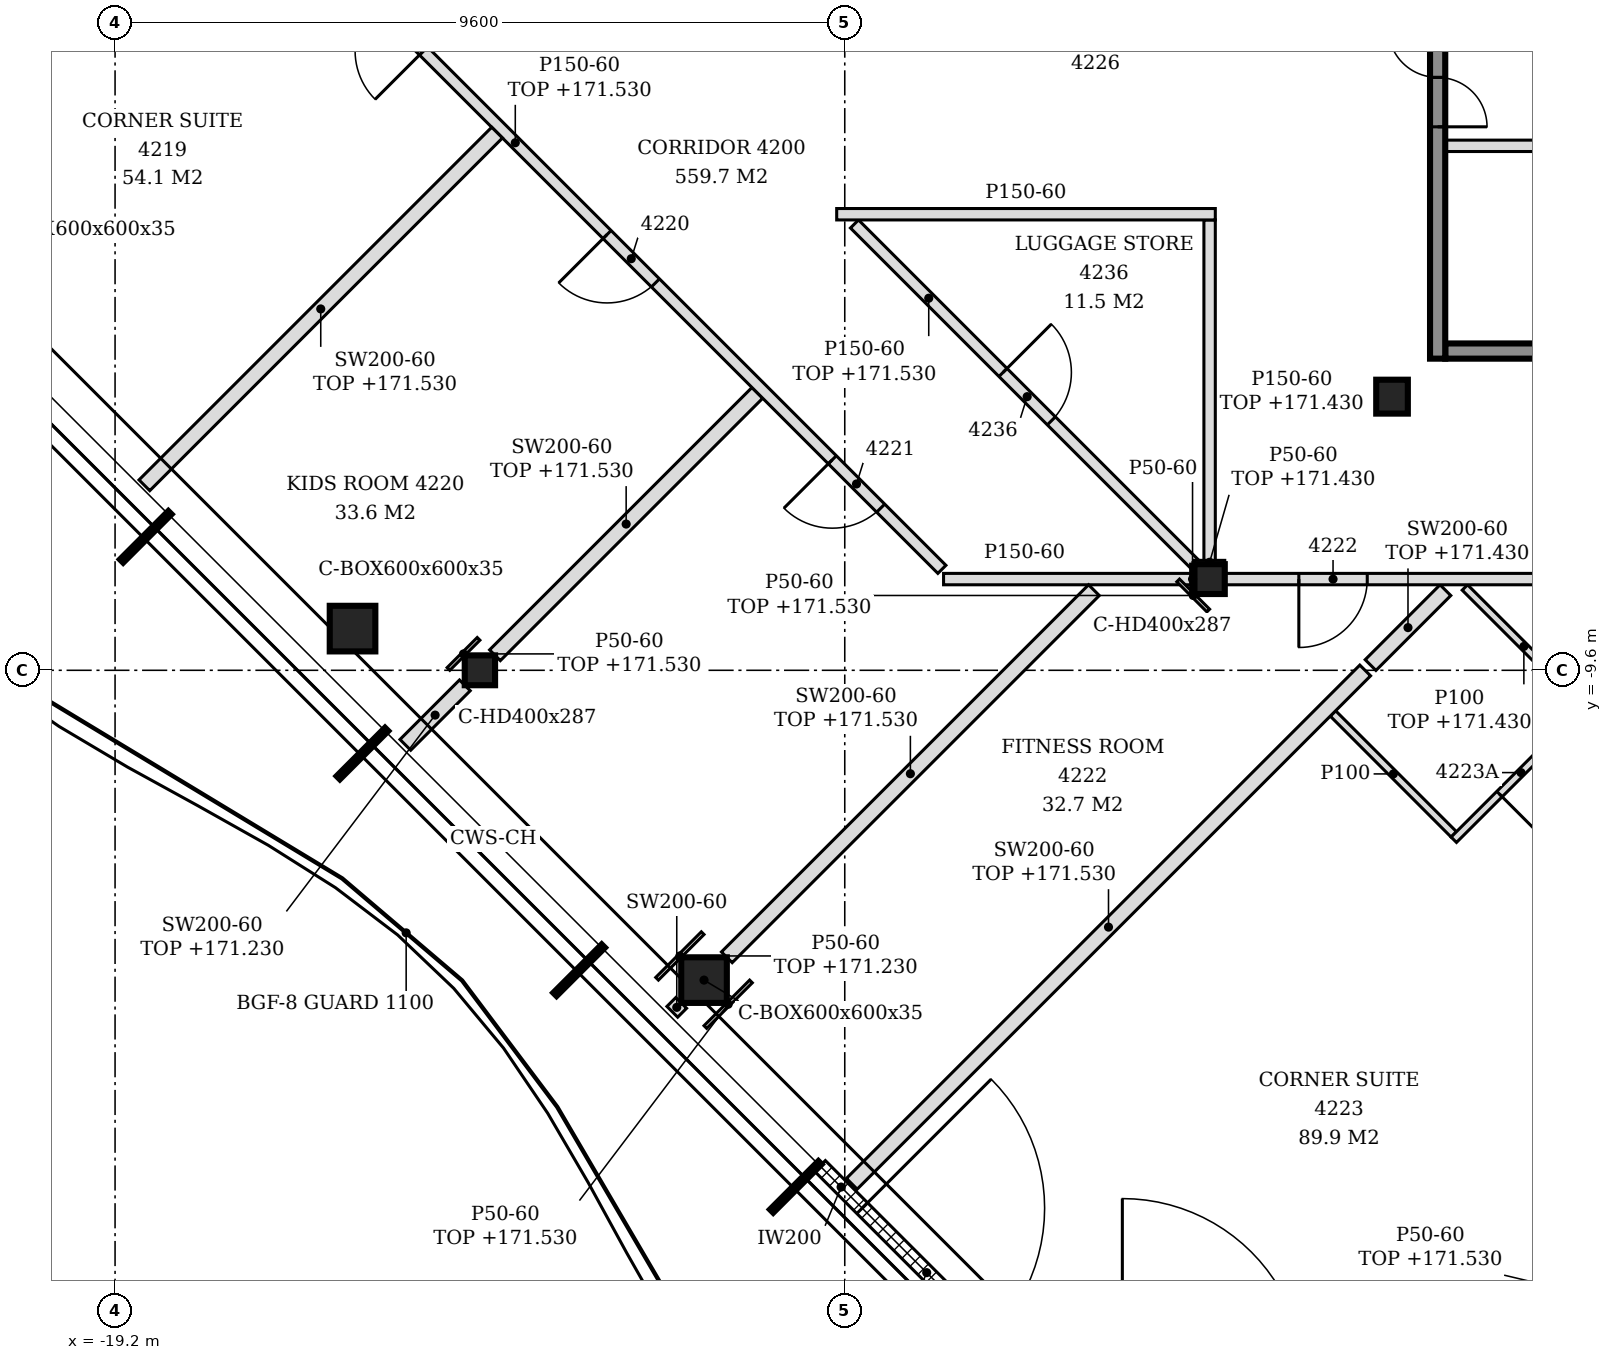
"""IFC4 building model, lengths in metres.
Left out: names, types, materials, properties, quantities, classifications, styles, units other than length and angle.
Written with IfcOpenShell. Run it as: python <this file> out.ifc"""

import sys

from ifc_helpers import new_model, si_unit, direction, frame, frame_2d, origin, origin_2d, place, context, subcontext, project, spatial, polyline, rectangle, hollow_rectangle, i_section, outline, extrude, clip, halfspace, element, fill, save


model = new_model("IFC4")
c1 = context("Model", 3, precision=1e-05, world=origin(), true_north=direction((0.0, 1.0)))
c2 = subcontext(c1, "Body", "Model", "MODEL_VIEW")
j1 = project(units=[si_unit("LENGTHUNIT", "METRE"), si_unit("PLANEANGLEUNIT", "RADIAN")], contexts=[c1])
p1 = place(None, origin())
s1 = spatial("IfcSite", under=j1, at=p1, CompositionType="ELEMENT")
p2 = place(p1, origin())
s2 = spatial("IfcBuilding", under=s1, at=p2, CompositionType="ELEMENT")
p3 = place(p2, frame((0.0, 0.0, 168.6)))
s3 = spatial("IfcBuildingStorey", under=s2, at=p3, CompositionType="ELEMENT", Elevation=168.6)
for number, where, z_axis, x_axis in (
    (1, (-16.076, -9.052, -0.15), (0.0, 0.0, 1.0), (1.0, 0.0, 0.0)),
    (2, (-11.451, -13.676, -0.15), (0.0, 0.0, 1.0), (1.0, 0.0, 0.0)),
):
    element("IfcColumn", number, at=place(p3, frame(where, z_axis=z_axis, x_axis=x_axis)), inside=s3, PredefinedType="COLUMN", context=c2, shape_type="Clipping", body=[
        clip(extrude(hollow_rectangle(XDim=0.6, YDim=0.6, WallThickness=0.035, at=origin_2d()), origin(), (0.0, 0.0, 1.0), 3.6), halfspace(frame((0.0, 0.0, 3.589), z_axis=(0.0, 0.0, 1.0), x_axis=(1.0, 0.0, 0.0)), False)),
    ])
p4 = place(p3, frame((-4.8, -8.4, -0.15), z_axis=(0.0, 0.0, 1.0), x_axis=(1.0, 0.0, 0.0)))
e3 = element("IfcColumn", 3, at=p4, inside=s3, PredefinedType="COLUMN", context=c2, shape_type="SweptSolid", body=[
    extrude(i_section(OverallWidth=0.399, OverallDepth=0.393, WebThickness=0.023, FlangeThickness=0.037, FilletRadius=0.015, at=origin_2d()), origin(), (0.0, 0.0, 1.0), 3.6),
])
p5 = place(p3, frame((-2.4, -6.0, -0.15), z_axis=(0.0, 0.0, 1.0), x_axis=(1.0, 0.0, 0.0)))
e4 = element("IfcColumn", 4, at=p5, inside=s3, PredefinedType="COLUMN", context=c2, shape_type="SweptSolid", body=[
    extrude(i_section(OverallWidth=0.416, OverallDepth=0.446, WebThickness=0.039, FlangeThickness=0.063, FilletRadius=0.015, at=origin_2d()), origin(), (0.0, 0.0, 1.0), 3.6),
])
p6 = place(p3, frame((-14.4, -9.6, -0.15), z_axis=(0.0, 0.0, 1.0), x_axis=(1.0, 0.0, 0.0)))
e5 = element("IfcColumn", 5, at=p6, inside=s3, PredefinedType="COLUMN", context=c2, shape_type="SweptSolid", body=[
    extrude(i_section(OverallWidth=0.399, OverallDepth=0.393, WebThickness=0.023, FlangeThickness=0.037, FilletRadius=0.015, at=origin_2d()), origin(), (0.0, 0.0, 1.0), 3.6),
])
p7 = place(p3, frame((-9.926, -16.121, 0.0), z_axis=(0.0, 0.0, 1.0), x_axis=(0.707137595296, -0.707075965734, 0.0)))
e6 = element("IfcWall", 6, at=p7, inside=s3, PredefinedType="NOTDEFINED", context=c2, shape_type="SweptSolid", body=[
    extrude(rectangle(XDim=3.961, YDim=0.2, at=frame_2d((1.981, 0.0))), origin(), (0.0, 0.0, 1.0), 3.45),
])
p8 = place(p7, frame((0.785, 0.0, 0.0)))
e7 = element("IfcOpeningElement", 7, at=p8, cuts=e6, PredefinedType="OPENING", context=c2, shape_type="SweptSolid", body=[
    extrude(rectangle(XDim=2.4, YDim=2.4, at=frame_2d((1.2, 1.2))), frame((0.0, 0.11, 0.0), z_axis=(0.0, -1.0, 0.0), x_axis=(1.0, 0.0, 0.0)), (0.0, 0.0, 1.0), 0.22),
])
p9 = place(p3, frame((-1.7, -5.4, 0.0), z_axis=(0.0, 0.0, 1.0), x_axis=(1.0, 0.0, 0.0)))
e8 = element("IfcWall", 8, at=p9, inside=s3, PredefinedType="SOLIDWALL", context=c2, shape_type="SweptSolid", body=[
    extrude(rectangle(XDim=7.9, YDim=0.2, at=frame_2d((3.95, 0.0))), origin(), (0.0, 0.0, 1.0), 3.45),
])
p10 = place(p3, frame((-1.7, -2.7, 0.0), z_axis=(0.0, 0.0, 1.0), x_axis=(1.0, 0.0, 0.0)))
e9 = element("IfcWall", 9, at=p10, inside=s3, PredefinedType="PARTITIONING", context=c2, shape_type="SweptSolid", body=[
    extrude(rectangle(XDim=7.825, YDim=0.15, at=frame_2d((3.913, 0.0))), origin(), (0.0, 0.0, 1.0), 3.45),
])
p11 = place(p10, frame((3.45, 0.0, 0.0)))
e10 = element("IfcOpeningElement", 10, at=p11, cuts=e9, PredefinedType="OPENING", context=c2, shape_type="SweptSolid", body=[
    extrude(rectangle(XDim=0.9, YDim=2.1, at=frame_2d((0.45, 1.05))), frame((0.0, 0.085, 0.0), z_axis=(0.0, -1.0, 0.0), x_axis=(1.0, 0.0, 0.0)), (0.0, 0.0, 1.0), 0.17),
])
p12 = place(p3, frame((-1.8, -5.5, 0.0), z_axis=(0.0, 0.0, 1.0), x_axis=(0.0, 1.0, 0.0)))
e11 = element("IfcWall", 11, at=p12, inside=s3, PredefinedType="SOLIDWALL", context=c2, shape_type="SweptSolid", body=[
    extrude(rectangle(XDim=15.8, YDim=0.2, at=frame_2d((7.9, 0.0))), origin(), (0.0, 0.0, 1.0), 3.45),
])
p13 = place(p12, frame((3.05, 0.0, 0.0)))
e12 = element("IfcOpeningElement", 12, at=p13, cuts=e11, PredefinedType="OPENING", context=c2, shape_type="SweptSolid", body=[
    extrude(rectangle(XDim=1.3, YDim=2.1, at=frame_2d((0.65, 1.05))), frame((0.0, 0.11, 0.0), z_axis=(0.0, -1.0, 0.0), x_axis=(1.0, 0.0, 0.0)), (0.0, 0.0, 1.0), 0.22),
])
p14 = place(p12, frame((11.45, 0.0, 0.0)))
e13 = element("IfcOpeningElement", 13, at=p14, cuts=e11, PredefinedType="OPENING", context=c2, shape_type="SweptSolid", body=[
    extrude(rectangle(XDim=1.3, YDim=2.1, at=frame_2d((0.65, 1.05))), frame((0.0, 0.11, 0.0), z_axis=(0.0, -1.0, 0.0), x_axis=(1.0, 0.0, 0.0)), (0.0, 0.0, 1.0), 0.22),
])
p15 = place(p3, frame((-9.507, -16.355, 0.0), z_axis=(0.0, 0.0, 1.0), x_axis=(0.707170680804, 0.707042875794, 0.0)))
e14 = element("IfcWall", 14, at=p15, inside=s3, PredefinedType="PARTITIONING", context=c2, shape_type="SweptSolid", body=[
    extrude(rectangle(XDim=9.551, YDim=0.2, at=frame_2d((4.776, 0.0))), origin(), (0.0, 0.0, 1.0), 2.93),
])
p16 = place(p3, frame((-11.869, -14.093, 0.0), z_axis=(0.0, 0.0, 1.0), x_axis=(0.707106781187, 0.707106781187, 0.0)))
e15 = element("IfcWall", 15, at=p16, inside=s3, PredefinedType="PARTITIONING", context=c2, shape_type="SweptSolid", body=[
    extrude(rectangle(XDim=0.166, YDim=0.2, at=frame_2d((0.083, 0.0))), origin(), (0.0, 0.0, 1.0), 3.45),
])
p17 = place(p3, frame((-11.152, -13.375, 0.0), z_axis=(0.0, 0.0, 1.0), x_axis=(0.707106781187, 0.707106781187, 0.0)))
e16 = element("IfcWall", 16, at=p17, inside=s3, PredefinedType="PARTITIONING", context=c2, shape_type="SweptSolid", body=[
    extrude(rectangle(XDim=6.83, YDim=0.2, at=frame_2d((3.415, 0.0))), origin(), (0.0, 0.0, 1.0), 2.93),
])
p18 = place(p3, frame((-1.587, -11.759, 0.0), z_axis=(0.0, 0.0, 1.0), x_axis=(-0.706889644159, 0.707323851557, 0.0)))
e17 = element("IfcWall", 17, at=p18, inside=s3, PredefinedType="PARTITIONING", context=c2, shape_type="SweptSolid", body=[
    extrude(rectangle(XDim=2.249, YDim=0.1, at=frame_2d((1.125, 0.0))), origin(), (0.0, 0.0, 1.0), 3.45),
])
p19 = place(p3, frame((-1.587, -11.829, 0.0), z_axis=(0.0, 0.0, 1.0), x_axis=(0.707350821469, 0.706862656651, 0.0)))
e18 = element("IfcWall", 18, at=p19, inside=s3, PredefinedType="PARTITIONING", context=c2, shape_type="SweptSolid", body=[
    extrude(rectangle(XDim=2.5, YDim=0.1, at=frame_2d((1.25, 0.0))), origin(), (0.0, 0.0, 1.0), 3.45),
])
p20 = place(p19, frame((0.85, 0.0, 0.0)))
e19 = element("IfcOpeningElement", 19, at=p20, cuts=e18, PredefinedType="OPENING", context=c2, shape_type="SweptSolid", body=[
    extrude(rectangle(XDim=0.8, YDim=2.1, at=frame_2d((0.4, 1.05))), frame((0.0, 0.06, 0.0), z_axis=(0.0, -1.0, 0.0), x_axis=(1.0, 0.0, 0.0)), (0.0, 0.0, 1.0), 0.12),
])
p21 = place(p3, frame((-15.381, -10.581, 0.0), z_axis=(0.0, 0.0, 1.0), x_axis=(0.707217034054, 0.706996511125, 0.0)))
e20 = element("IfcWall", 20, at=p21, inside=s3, PredefinedType="PARTITIONING", context=c2, shape_type="SweptSolid", body=[
    extrude(rectangle(XDim=1.107, YDim=0.2, at=frame_2d((0.554, 0.0))), origin(), (0.0, 0.0, 1.0), 2.63),
])
p22 = place(p3, frame((0.111, -10.062, 0.0), z_axis=(0.0, 0.0, 1.0), x_axis=(-0.70732924673, 0.706884245631, 0.0)))
e21 = element("IfcWall", 21, at=p22, inside=s3, PredefinedType="PARTITIONING", context=c2, shape_type="SweptSolid", body=[
    extrude(rectangle(XDim=2.195, YDim=0.1, at=frame_2d((1.097, 0.0))), origin(), (0.0, 0.0, 1.0), 2.83),
])
p23 = place(p3, frame((-2.683, -9.531, 0.0), z_axis=(0.0, 0.0, 1.0), x_axis=(0.707019164958, 0.70719438656, 0.0)))
e22 = element("IfcWall", 22, at=p23, inside=s3, PredefinedType="PARTITIONING", context=c2, shape_type="SweptSolid", body=[
    extrude(rectangle(XDim=1.393, YDim=0.2, at=frame_2d((0.697, 0.0))), origin(), (0.0, 0.0, 1.0), 2.83),
])
p24 = place(p3, frame((-14.202, -9.402, 0.0), z_axis=(0.0, 0.0, 1.0), x_axis=(0.707081776084, 0.707131785404, 0.0)))
e23 = element("IfcWall", 23, at=p24, inside=s3, PredefinedType="PARTITIONING", context=c2, shape_type="SweptSolid", body=[
    extrude(rectangle(XDim=4.882, YDim=0.2, at=frame_2d((2.441, 0.0))), origin(), (0.0, 0.0, 1.0), 2.93),
])
p25 = place(p3, frame((-8.3, -8.4, 0.0), z_axis=(0.0, 0.0, 1.0), x_axis=(1.0, 0.0, 0.0)))
e24 = element("IfcWall", 24, at=p25, inside=s3, PredefinedType="PARTITIONING", context=c2, shape_type="SweptSolid", body=[
    extrude(rectangle(XDim=3.301, YDim=0.15, at=frame_2d((1.65, 0.0))), origin(), (0.0, 0.0, 1.0), 3.45),
])
p26 = place(p3, frame((-4.601, -8.4, 0.0), z_axis=(0.0, 0.0, 1.0), x_axis=(1.0, 0.0, 0.0)))
e25 = element("IfcWall", 25, at=p26, inside=s3, PredefinedType="PARTITIONING", context=c2, shape_type="SweptSolid", body=[
    extrude(rectangle(XDim=11.601, YDim=0.15, at=frame_2d((5.801, 0.0))), origin(), (0.0, 0.0, 1.0), 2.83),
])
p27 = place(p26, frame((0.974, 0.0, 0.0)))
e26 = element("IfcOpeningElement", 26, at=p27, cuts=e25, PredefinedType="OPENING", context=c2, shape_type="SweptSolid", body=[
    extrude(rectangle(XDim=0.9, YDim=2.1, at=frame_2d((0.45, 1.05))), frame((0.0, 0.085, 0.0), z_axis=(0.0, -1.0, 0.0), x_axis=(1.0, 0.0, 0.0)), (0.0, 0.0, 1.0), 0.17),
])
p28 = place(p26, frame((4.636, 0.0, 0.0)))
e27 = element("IfcOpeningElement", 27, at=p28, cuts=e25, PredefinedType="OPENING", context=c2, shape_type="SweptSolid", body=[
    extrude(rectangle(XDim=0.9, YDim=2.1, at=frame_2d((0.45, 1.05))), frame((0.0, 0.085, 0.0), z_axis=(0.0, -1.0, 0.0), x_axis=(1.0, 0.0, 0.0)), (0.0, 0.0, 1.0), 0.17),
])
p29 = place(p26, frame((8.592, 0.0, 0.0)))
e28 = element("IfcOpeningElement", 28, at=p29, cuts=e25, PredefinedType="OPENING", context=c2, shape_type="SweptSolid", body=[
    extrude(rectangle(XDim=0.9, YDim=2.1, at=frame_2d((0.45, 1.05))), frame((0.0, 0.085, 0.0), z_axis=(0.0, -1.0, 0.0), x_axis=(1.0, 0.0, 0.0)), (0.0, 0.0, 1.0), 0.17),
])
p30 = place(p3, frame((-8.322, -8.272, 0.0), z_axis=(0.0, 0.0, 1.0), x_axis=(-0.707117118476, 0.707096443746, 0.0)))
e29 = element("IfcWall", 29, at=p30, inside=s3, PredefinedType="PARTITIONING", context=c2, shape_type="SweptSolid", body=[
    extrude(rectangle(XDim=11.809, YDim=0.15, at=frame_2d((5.904, 0.0))), origin(), (0.0, 0.0, 1.0), 2.93),
])
p31 = place(p30, frame((9.645, 0.0, 0.0)))
e30 = element("IfcOpeningElement", 30, at=p31, cuts=e29, PredefinedType="OPENING", context=c2, shape_type="SweptSolid", body=[
    extrude(rectangle(XDim=0.9, YDim=2.1, at=frame_2d((0.45, 1.05))), frame((0.0, 0.085, 0.0), z_axis=(0.0, -1.0, 0.0), x_axis=(1.0, 0.0, 0.0)), (0.0, 0.0, 1.0), 0.17),
])
p32 = place(p30, frame((5.33, 0.0, 0.0)))
e31 = element("IfcOpeningElement", 31, at=p32, cuts=e29, PredefinedType="OPENING", context=c2, shape_type="SweptSolid", body=[
    extrude(rectangle(XDim=0.9, YDim=2.1, at=frame_2d((0.45, 1.05))), frame((0.0, 0.085, 0.0), z_axis=(0.0, -1.0, 0.0), x_axis=(1.0, 0.0, 0.0)), (0.0, 0.0, 1.0), 0.17),
])
p33 = place(p30, frame((1.139, 0.0, 0.0)))
e32 = element("IfcOpeningElement", 32, at=p33, cuts=e29, PredefinedType="OPENING", context=c2, shape_type="SweptSolid", body=[
    extrude(rectangle(XDim=0.9, YDim=2.1, at=frame_2d((0.45, 1.05))), frame((0.0, 0.085, 0.0), z_axis=(0.0, -1.0, 0.0), x_axis=(1.0, 0.0, 0.0)), (0.0, 0.0, 1.0), 0.17),
])
p34 = place(p3, frame((-4.998, -8.202, 0.0), z_axis=(0.0, 0.0, 1.0), x_axis=(-0.707106781187, 0.707106781187, 0.0)))
e33 = element("IfcWall", 33, at=p34, inside=s3, PredefinedType="PARTITIONING", context=c2, shape_type="SweptSolid", body=[
    extrude(rectangle(XDim=6.327, YDim=0.15, at=frame_2d((3.164, 0.0))), origin(), (0.0, 0.0, 1.0), 2.93),
])
p35 = place(p34, frame((2.664, 0.0, 0.0)))
e34 = element("IfcOpeningElement", 34, at=p35, cuts=e33, PredefinedType="OPENING", context=c2, shape_type="SweptSolid", body=[
    extrude(rectangle(XDim=0.9, YDim=2.1, at=frame_2d((0.45, 1.05))), frame((0.0, 0.085, 0.0), z_axis=(0.0, -1.0, 0.0), x_axis=(1.0, 0.0, 0.0)), (0.0, 0.0, 1.0), 0.17),
])
p36 = place(p3, frame((-4.8, -8.204, 0.0), z_axis=(0.0, 0.0, 1.0), x_axis=(0.0, 1.0, 0.0)))
e35 = element("IfcWall", 35, at=p36, inside=s3, PredefinedType="PARTITIONING", context=c2, shape_type="SweptSolid", body=[
    extrude(rectangle(XDim=4.529, YDim=0.15, at=frame_2d((2.264, 0.0))), origin(), (0.0, 0.0, 1.0), 2.83),
])
p37 = place(p3, frame((-18.814, -7.166, 0.0), z_axis=(0.0, 0.0, 1.0), x_axis=(0.707088178254, 0.70712538363, 0.0)))
e36 = element("IfcWall", 36, at=p37, inside=s3, PredefinedType="PARTITIONING", context=c2, shape_type="SweptSolid", body=[
    extrude(rectangle(XDim=6.562, YDim=0.2, at=frame_2d((3.281, 0.0))), origin(), (0.0, 0.0, 1.0), 2.93),
])
p38 = place(p3, frame((-9.706, -3.6, 0.0), z_axis=(0.0, 0.0, 1.0), x_axis=(1.0, 0.0, 0.0)))
e37 = element("IfcWall", 37, at=p38, inside=s3, PredefinedType="PARTITIONING", context=c2, shape_type="SweptSolid", body=[
    extrude(outline(polyline([(0.0, 0.0), (4.981, 0.0), (4.981, 2.83), (4.756, 2.83), (4.754, 3.45), (0.0, 3.45), (0.0, 0.0)])), frame((0.0, 0.075, 0.0), z_axis=(0.0, -1.0, 0.0), x_axis=(1.0, 0.0, 0.0)), (0.0, 0.0, 1.0), 0.15),
])
p39 = place(p3, frame((-12.069, -13.658, 0.0), z_axis=(0.0, 0.0, 1.0), x_axis=(0.707106781187, 0.707106781187, 0.0)))
e38 = element("IfcWall", 38, at=p39, inside=s3, PredefinedType="PARTITIONING", context=c2, shape_type="SweptSolid", body=[
    extrude(rectangle(XDim=0.848, YDim=0.05, at=frame_2d((0.424, 0.0))), origin(), (0.0, 0.0, 1.0), 2.63),
])
p40 = place(p3, frame((-11.434, -14.293, 0.0), z_axis=(0.0, 0.0, 1.0), x_axis=(0.707106781187, 0.707106781187, 0.0)))
e39 = element("IfcWall", 39, at=p40, inside=s3, PredefinedType="PARTITIONING", context=c2, shape_type="SweptSolid", body=[
    extrude(rectangle(XDim=0.849, YDim=0.05, at=frame_2d((0.424, 0.0))), origin(), (0.0, 0.0, 1.0), 2.93),
])
p41 = place(p3, frame((-14.814, -9.582, 0.0), z_axis=(0.0, 0.0, 1.0), x_axis=(0.707106781187, 0.707106781187, 0.0)))
e40 = element("IfcWall", 40, at=p41, inside=s3, PredefinedType="PARTITIONING", context=c2, shape_type="SweptSolid", body=[
    extrude(rectangle(XDim=0.56, YDim=0.05, at=frame_2d((0.28, 0.0))), origin(), (0.0, 0.0, 1.0), 2.93),
])
p42 = place(p3, frame((-5.0, -8.178, 0.0), z_axis=(0.0, 0.0, 1.0), x_axis=(1.0, 0.0, 0.0)))
e41 = element("IfcWall", 41, at=p42, inside=s3, PredefinedType="PARTITIONING", context=c2, shape_type="SweptSolid", body=[
    extrude(rectangle(XDim=0.399, YDim=0.05, at=frame_2d((0.199, 0.0))), origin(), (0.0, 0.0, 1.0), 2.83),
])
p43 = place(p3, frame((-4.818, -8.814, 0.0), z_axis=(0.0, 0.0, 1.0), x_axis=(-0.707106781187, 0.707106781187, 0.0)))
e42 = element("IfcWall", 42, at=p43, inside=s3, PredefinedType="PARTITIONING", context=c2, shape_type="SweptSolid", body=[
    extrude(rectangle(XDim=0.56, YDim=0.05, at=frame_2d((0.28, 0.0))), origin(), (0.0, 0.0, 1.0), 2.93),
])
p44 = place(p3, frame((-5.024, -8.596, 0.0), z_axis=(0.0, 0.0, 1.0), x_axis=(0.0, 1.0, 0.0)))
e43 = element("IfcWall", 43, at=p44, inside=s3, PredefinedType="PARTITIONING", context=c2, shape_type="SweptSolid", body=[
    extrude(rectangle(XDim=0.393, YDim=0.05, at=frame_2d((0.196, 0.0))), origin(), (0.0, 0.0, 1.0), 3.45),
])
p45 = place(p8, origin())
e44 = element("IfcDoor", 44, at=p45, inside=s3, OperationType="SINGLE_SWING_LEFT", PredefinedType="DOOR", context=c2, shape_type="SweptSolid", body=[
    extrude(rectangle(XDim=2.4, YDim=2.4, at=frame_2d((1.2, 1.2))), frame((0.0, 0.025, 0.0), z_axis=(0.0, -1.0, 0.0), x_axis=(1.0, 0.0, 0.0)), (0.0, 0.0, 1.0), 0.05),
])
fill(e7, e44)
p46 = place(p13, origin())
e45 = element("IfcDoor", 45, at=p46, inside=s3, OperationType="DOUBLE_DOOR_SINGLE_SWING", PredefinedType="DOOR", context=c2, shape_type="SweptSolid", body=[
    extrude(rectangle(XDim=1.3, YDim=2.1, at=frame_2d((0.65, 1.05))), frame((0.0, 0.025, 0.0), z_axis=(0.0, -1.0, 0.0), x_axis=(1.0, 0.0, 0.0)), (0.0, 0.0, 1.0), 0.05),
])
fill(e12, e45)
p47 = place(p32, origin())
e46 = element("IfcDoor", 46, at=p47, inside=s3, OperationType="SINGLE_SWING_RIGHT", PredefinedType="DOOR", context=c2, shape_type="SweptSolid", body=[
    extrude(rectangle(XDim=0.9, YDim=2.1, at=frame_2d((0.45, 1.05))), frame((0.0, 0.025, 0.0), z_axis=(0.0, -1.0, 0.0), x_axis=(1.0, 0.0, 0.0)), (0.0, 0.0, 1.0), 0.05),
])
fill(e31, e46)
p48 = place(p33, origin())
e47 = element("IfcDoor", 47, at=p48, inside=s3, OperationType="SINGLE_SWING_RIGHT", PredefinedType="DOOR", context=c2, shape_type="SweptSolid", body=[
    extrude(rectangle(XDim=0.9, YDim=2.1, at=frame_2d((0.45, 1.05))), frame((0.0, 0.025, 0.0), z_axis=(0.0, -1.0, 0.0), x_axis=(1.0, 0.0, 0.0)), (0.0, 0.0, 1.0), 0.05),
])
fill(e32, e47)
p49 = place(p27, frame((0.9, 0.0, 0.0), z_axis=(0.0, 0.0, 1.0), x_axis=(-1.0, 0.0, 0.0)))
e48 = element("IfcDoor", 48, at=p49, inside=s3, OperationType="SINGLE_SWING_RIGHT", PredefinedType="DOOR", context=c2, shape_type="SweptSolid", body=[
    extrude(rectangle(XDim=0.9, YDim=2.1, at=frame_2d((0.45, 1.05))), frame((0.0, 0.025, 0.0), z_axis=(0.0, -1.0, 0.0), x_axis=(1.0, 0.0, 0.0)), (0.0, 0.0, 1.0), 0.05),
])
fill(e26, e48)
p50 = place(p20, frame((0.8, 0.0, 0.0), z_axis=(0.0, 0.0, 1.0), x_axis=(-1.0, 0.0, 0.0)))
e49 = element("IfcDoor", 49, at=p50, inside=s3, OperationType="SINGLE_SWING_RIGHT", PredefinedType="DOOR", context=c2, shape_type="SweptSolid", body=[
    extrude(rectangle(XDim=0.8, YDim=2.1, at=frame_2d((0.4, 1.05))), frame((0.0, 0.025, 0.0), z_axis=(0.0, -1.0, 0.0), x_axis=(1.0, 0.0, 0.0)), (0.0, 0.0, 1.0), 0.05),
])
fill(e19, e49)
p51 = place(p35, frame((0.9, 0.0, 0.0), z_axis=(0.0, 0.0, 1.0), x_axis=(-1.0, 0.0, 0.0)))
e50 = element("IfcDoor", 50, at=p51, inside=s3, OperationType="SINGLE_SWING_LEFT", PredefinedType="DOOR", context=c2, shape_type="SweptSolid", body=[
    extrude(rectangle(XDim=0.9, YDim=2.1, at=frame_2d((0.45, 1.05))), frame((0.0, 0.025, 0.0), z_axis=(0.0, -1.0, 0.0), x_axis=(1.0, 0.0, 0.0)), (0.0, 0.0, 1.0), 0.05),
])
fill(e34, e50)
save(model, sys.argv[1])
